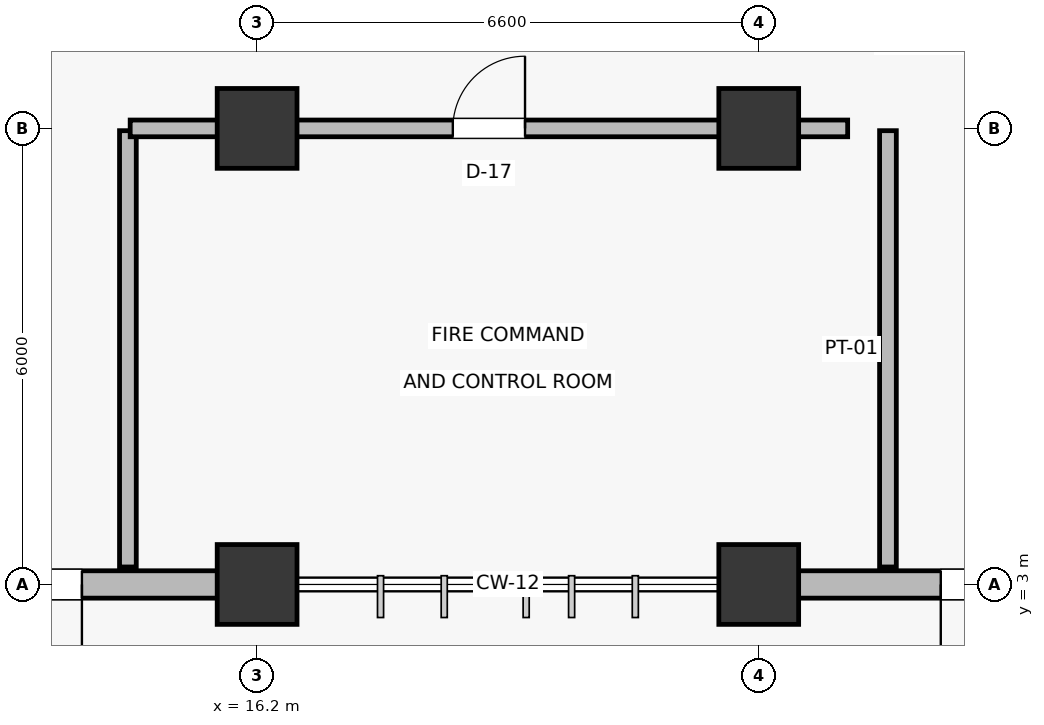
"""IFC4 building model, lengths in metres.
Left out: names, types, materials, properties, quantities, classifications, styles, units other than length and angle.
Written with IfcOpenShell. Run it as: python <this file> out.ifc"""

import sys

from ifc_helpers import new_model, si_unit, direction, frame, frame_2d, origin, origin_2d, place, context, subcontext, project, spatial, rectangle, extrude, element, fill, save


model = new_model("IFC4")
c1 = context("Model", 3, precision=1e-05, world=origin(), true_north=direction((0.0, 1.0)))
c2 = subcontext(c1, "Body", "Model", "MODEL_VIEW")
j1 = project(units=[si_unit("LENGTHUNIT", "METRE"), si_unit("PLANEANGLEUNIT", "RADIAN")], contexts=[c1])
p1 = place(None, origin())
s1 = spatial("IfcSite", under=j1, at=p1, CompositionType="ELEMENT")
p2 = place(p1, origin())
s2 = spatial("IfcBuilding", under=s1, at=p2, CompositionType="ELEMENT")
p3 = place(p2, origin())
s3 = spatial("IfcBuildingStorey", under=s2, at=p3, CompositionType="ELEMENT", Elevation=0.0)
for number, where, z_axis, x_axis in (
    (1, (16.2, 3.0, 0.0), (0.0, 0.0, 1.0), (1.0, 0.0, 0.0)),
    (2, (16.2, 9.0, 0.0), (0.0, 0.0, 1.0), (1.0, 0.0, 0.0)),
    (3, (22.8, 3.0, 0.0), (0.0, 0.0, 1.0), (1.0, 0.0, 0.0)),
    (4, (22.8, 9.0, 0.0), (0.0, 0.0, 1.0), (1.0, 0.0, 0.0)),
):
    element("IfcColumn", number, at=place(p3, frame(where, z_axis=z_axis, x_axis=x_axis)), inside=s3, PredefinedType="COLUMN", context=c2, shape_type="SweptSolid", body=[
        extrude(rectangle(XDim=1.05, YDim=1.05, at=origin_2d()), origin(), (0.0, 0.0, 1.0), 5.4),
    ])
p4 = place(p3, frame((10.105, 3.0, 0.0), z_axis=(0.0, 0.0, 1.0), x_axis=(1.0, 0.0, 0.0)))
e5 = element("IfcWall", 5, at=p4, inside=s3, PredefinedType="SOLIDWALL", context=c2, shape_type="SweptSolid", body=[
    extrude(rectangle(XDim=5.58, YDim=0.36, at=frame_2d((2.79, 0.0))), origin(), (0.0, 0.0, 1.0), 4.475),
])
p5 = place(p4, frame((1.79, 0.0, 0.0)))
e6 = element("IfcOpeningElement", 6, at=p5, cuts=e5, PredefinedType="OPENING", context=c2, shape_type="SweptSolid", body=[
    extrude(rectangle(XDim=2.0, YDim=2.4, at=frame_2d((1.0, 1.2))), frame((0.0, 0.19, 0.0), z_axis=(0.0, -1.0, 0.0), x_axis=(1.0, 0.0, 0.0)), (0.0, 0.0, 1.0), 0.38),
])
p6 = place(p3, frame((23.305, 3.0, 0.0), z_axis=(0.0, 0.0, 1.0), x_axis=(1.0, 0.0, 0.0)))
e7 = element("IfcWall", 7, at=p6, inside=s3, PredefinedType="SOLIDWALL", context=c2, shape_type="SweptSolid", body=[
    extrude(rectangle(XDim=5.58, YDim=0.36, at=frame_2d((2.79, 0.0))), origin(), (0.0, 0.0, 1.0), 4.475),
])
p7 = place(p6, frame((1.89, 0.0, 0.0)))
e8 = element("IfcOpeningElement", 8, at=p7, cuts=e7, PredefinedType="OPENING", context=c2, shape_type="SweptSolid", body=[
    extrude(rectangle(XDim=1.8, YDim=2.3, at=frame_2d((0.9, 1.15))), frame((0.0, 0.19, 0.0), z_axis=(0.0, -1.0, 0.0), x_axis=(1.0, 0.0, 0.0)), (0.0, 0.0, 1.0), 0.38),
])
for number, where, z_axis, x_axis in (
    (9, (24.5, 3.23, 0.0), (0.0, 0.0, 1.0), (0.0, 1.0, 0.0)),
    (10, (14.5, 3.23, 0.0), (0.0, 0.0, 1.0), (0.0, 1.0, 0.0)),
):
    element("IfcWall", number, at=place(p3, frame(where, z_axis=z_axis, x_axis=x_axis)), inside=s3, PredefinedType="PARTITIONING", context=c2, shape_type="SweptSolid", body=[
        extrude(rectangle(XDim=5.74, YDim=0.22, at=frame_2d((2.87, 0.0))), origin(), (0.0, 0.0, 1.0), 4.425),
    ])
p8 = place(p3, frame((14.53, 9.0, 0.0), z_axis=(0.0, 0.0, 1.0), x_axis=(1.0, 0.0, 0.0)))
e11 = element("IfcWall", 11, at=p8, inside=s3, PredefinedType="PARTITIONING", context=c2, shape_type="SweptSolid", body=[
    extrude(rectangle(XDim=9.44, YDim=0.22, at=frame_2d((4.72, 0.0))), origin(), (0.0, 0.0, 1.0), 4.255),
])
p9 = place(p8, frame((4.245, 0.0, 0.0)))
e12 = element("IfcOpeningElement", 12, at=p9, cuts=e11, PredefinedType="OPENING", context=c2, shape_type="SweptSolid", body=[
    extrude(rectangle(XDim=0.95, YDim=2.15, at=frame_2d((0.475, 1.075))), frame((0.0, 0.12, 0.0), z_axis=(0.0, -1.0, 0.0), x_axis=(1.0, 0.0, 0.0)), (0.0, 0.0, 1.0), 0.24),
])
p10 = place(p5, frame((2.0, 0.0, 0.0), z_axis=(0.0, 0.0, 1.0), x_axis=(-1.0, 0.0, 0.0)))
e13 = element("IfcDoor", 13, at=p10, inside=s3, OperationType="DOUBLE_DOOR_SINGLE_SWING", PredefinedType="DOOR", context=c2, shape_type="SweptSolid", body=[
    extrude(rectangle(XDim=2.0, YDim=2.4, at=frame_2d((1.0, 1.2))), frame((0.0, 0.025, 0.0), z_axis=(0.0, -1.0, 0.0), x_axis=(1.0, 0.0, 0.0)), (0.0, 0.0, 1.0), 0.05),
])
fill(e6, e13)
p11 = place(p7, frame((1.8, 0.0, 0.0), z_axis=(0.0, 0.0, 1.0), x_axis=(-1.0, 0.0, 0.0)))
e14 = element("IfcDoor", 14, at=p11, inside=s3, OperationType="DOUBLE_DOOR_SINGLE_SWING", PredefinedType="DOOR", context=c2, shape_type="SweptSolid", body=[
    extrude(rectangle(XDim=1.8, YDim=2.3, at=frame_2d((0.9, 1.15))), frame((0.0, 0.025, 0.0), z_axis=(0.0, -1.0, 0.0), x_axis=(1.0, 0.0, 0.0)), (0.0, 0.0, 1.0), 0.05),
])
fill(e8, e14)
p12 = place(p9, origin())
e15 = element("IfcDoor", 15, at=p12, inside=s3, OperationType="SINGLE_SWING_RIGHT", PredefinedType="DOOR", context=c2, shape_type="SweptSolid", body=[
    extrude(rectangle(XDim=0.95, YDim=2.15, at=frame_2d((0.475, 1.075))), frame((0.0, 0.025, 0.0), z_axis=(0.0, -1.0, 0.0), x_axis=(1.0, 0.0, 0.0)), (0.0, 0.0, 1.0), 0.05),
])
fill(e12, e15)
save(model, sys.argv[1])
